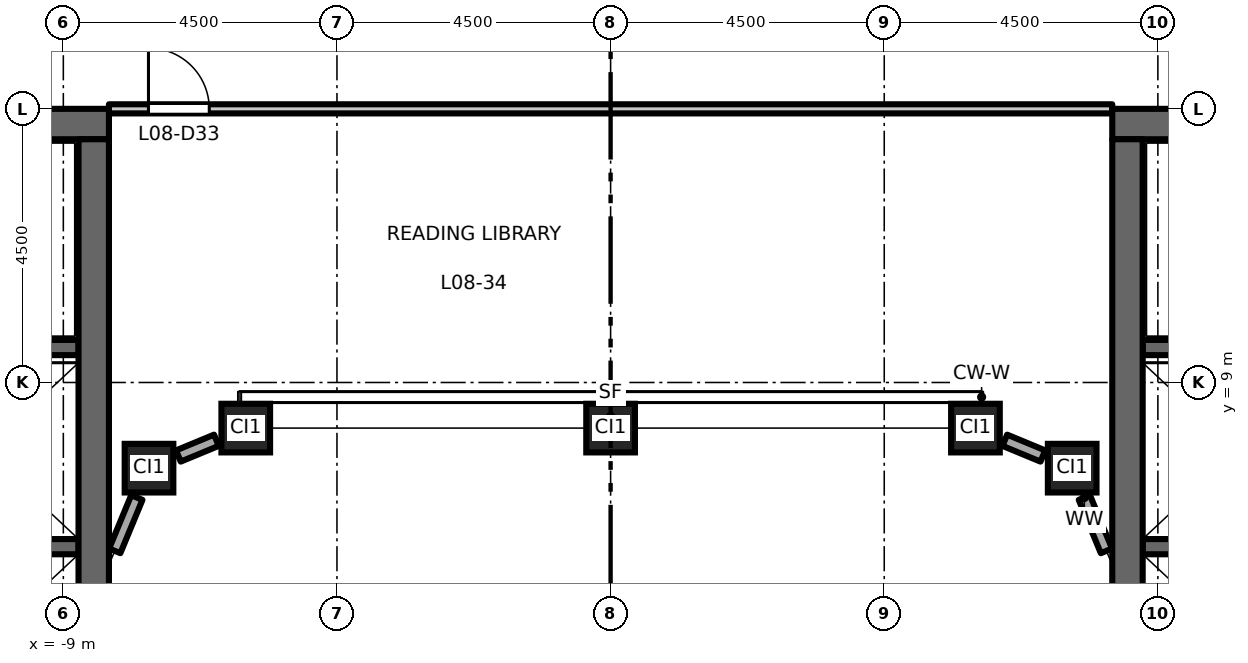
"""IFC4 building model, lengths in metres.
Left out: names, types, materials, properties, quantities, classifications, styles, units other than length and angle.
Written with IfcOpenShell. Run it as: python <this file> out.ifc"""

import sys

from ifc_helpers import new_model, si_unit, direction, frame, frame_2d, origin, origin_2d, place, context, subcontext, project, spatial, rectangle, hollow_rectangle, extrude, element, fill, save


model = new_model("IFC4")
c1 = context("Model", 3, precision=1e-05, world=origin(), true_north=direction((0.0, 1.0)))
c2 = subcontext(c1, "Body", "Model", "MODEL_VIEW")
j1 = project(units=[si_unit("LENGTHUNIT", "METRE"), si_unit("PLANEANGLEUNIT", "RADIAN")], contexts=[c1])
p1 = place(None, origin())
s1 = spatial("IfcSite", under=j1, at=p1, CompositionType="ELEMENT")
p2 = place(p1, origin())
s2 = spatial("IfcBuilding", under=s1, at=p2, CompositionType="ELEMENT")
p3 = place(p2, frame((0.0, 0.0, 40.2)))
s3 = spatial("IfcBuildingStorey", under=s2, at=p3, CompositionType="ELEMENT", Elevation=40.2)
for number, where, z_axis, x_axis in (
    (1, (-7.591, 7.591, 0.0), (0.0, 0.0, 1.0), (1.0, 0.0, 0.0)),
    (2, (-6.0, 8.25, 0.0), (0.0, 0.0, 1.0), (1.0, 0.0, 0.0)),
    (3, (0.0, 8.25, 0.0), (0.0, 0.0, 1.0), (1.0, 0.0, 0.0)),
    (4, (6.0, 8.25, 0.0), (0.0, 0.0, 1.0), (1.0, 0.0, 0.0)),
    (5, (7.591, 7.591, 0.0), (0.0, 0.0, 1.0), (1.0, 0.0, 0.0)),
):
    element("IfcColumn", number, at=place(p3, frame(where, z_axis=z_axis, x_axis=x_axis)), inside=s3, PredefinedType="COLUMN", context=c2, shape_type="SweptSolid", body=[
        extrude(hollow_rectangle(XDim=0.8, YDim=0.8, WallThickness=0.05, at=origin_2d()), origin(), (0.0, 0.0, 1.0), 4.5),
    ])
p4 = place(p3, frame((-8.75, 6.3, 0.0), z_axis=(0.0, 0.0, 1.0), x_axis=(-1.0, 0.0, 0.0)))
e6 = element("IfcWall", 6, at=p4, inside=s3, PredefinedType="SHEAR", context=c2, shape_type="SweptSolid", body=[
    extrude(rectangle(XDim=3.1, YDim=0.25, at=frame_2d((1.55, 0.0))), origin(), (0.0, 0.0, 1.0), 4.35),
])
p5 = place(p3, frame((-8.75, 9.575, 0.0), z_axis=(0.0, 0.0, 1.0), x_axis=(-1.0, 0.0, 0.0)))
e7 = element("IfcWall", 7, at=p5, inside=s3, PredefinedType="SHEAR", context=c2, shape_type="SweptSolid", body=[
    extrude(rectangle(XDim=8.0, YDim=0.25, at=frame_2d((4.0, 0.0))), origin(), (0.0, 0.0, 1.0), 4.35),
])
p6 = place(p5, frame((6.65, 0.0, 0.0)))
e8 = element("IfcOpeningElement", 8, at=p6, cuts=e7, PredefinedType="OPENING", context=c2, shape_type="SweptSolid", body=[
    extrude(rectangle(XDim=1.1, YDim=2.1, at=frame_2d((0.55, 1.05))), frame((0.0, 0.135, 0.0), z_axis=(0.0, -1.0, 0.0), x_axis=(1.0, 0.0, 0.0)), (0.0, 0.0, 1.0), 0.27),
])
p7 = place(p3, frame((-8.25, 13.25, 0.0), z_axis=(0.0, 0.0, 1.0), x_axis=(-1.0, 0.0, 0.0)))
e9 = element("IfcWall", 9, at=p7, inside=s3, PredefinedType="SHEAR", context=c2, shape_type="SweptSolid", body=[
    extrude(rectangle(XDim=13.5, YDim=0.5, at=frame_2d((6.75, 0.0))), origin(), (0.0, 0.0, 1.0), 4.35),
])
p8 = place(p3, frame((-8.5, -13.0, 0.0), z_axis=(0.0, 0.0, 1.0), x_axis=(0.0, 1.0, 0.0)))
e10 = element("IfcWall", 10, at=p8, inside=s3, PredefinedType="SHEAR", context=c2, shape_type="SweptSolid", body=[
    extrude(rectangle(XDim=26.0, YDim=0.5, at=frame_2d((13.0, 0.0))), origin(), (0.0, 0.0, 1.0), 4.35),
])
p9 = place(p3, frame((8.75, 6.3, 0.0), z_axis=(0.0, 0.0, 1.0), x_axis=(1.0, 0.0, 0.0)))
e11 = element("IfcWall", 11, at=p9, inside=s3, PredefinedType="SHEAR", context=c2, shape_type="SweptSolid", body=[
    extrude(rectangle(XDim=3.1, YDim=0.25, at=frame_2d((1.55, 0.0))), origin(), (0.0, 0.0, 1.0), 4.35),
])
p10 = place(p3, frame((8.75, 9.575, 0.0), z_axis=(0.0, 0.0, 1.0), x_axis=(1.0, 0.0, 0.0)))
e12 = element("IfcWall", 12, at=p10, inside=s3, PredefinedType="SHEAR", context=c2, shape_type="SweptSolid", body=[
    extrude(rectangle(XDim=8.0, YDim=0.25, at=frame_2d((4.0, 0.0))), origin(), (0.0, 0.0, 1.0), 4.35),
])
p11 = place(p10, frame((6.65, 0.0, 0.0)))
e13 = element("IfcOpeningElement", 13, at=p11, cuts=e12, PredefinedType="OPENING", context=c2, shape_type="SweptSolid", body=[
    extrude(rectangle(XDim=1.1, YDim=2.1, at=frame_2d((0.55, 1.05))), frame((0.0, 0.135, 0.0), z_axis=(0.0, -1.0, 0.0), x_axis=(1.0, 0.0, 0.0)), (0.0, 0.0, 1.0), 0.27),
])
p12 = place(p3, frame((8.25, 13.25, 0.0), z_axis=(0.0, 0.0, 1.0), x_axis=(1.0, 0.0, 0.0)))
e14 = element("IfcWall", 14, at=p12, inside=s3, PredefinedType="SHEAR", context=c2, shape_type="SweptSolid", body=[
    extrude(rectangle(XDim=13.5, YDim=0.5, at=frame_2d((6.75, 0.0))), origin(), (0.0, 0.0, 1.0), 4.35),
])
p13 = place(p3, frame((8.5, -13.0, 0.0), z_axis=(0.0, 0.0, 1.0), x_axis=(0.0, 1.0, 0.0)))
e15 = element("IfcWall", 15, at=p13, inside=s3, PredefinedType="SHEAR", context=c2, shape_type="SweptSolid", body=[
    extrude(rectangle(XDim=26.0, YDim=0.5, at=frame_2d((13.0, 0.0))), origin(), (0.0, 0.0, 1.0), 4.35),
])
p14 = place(p3, frame((8.154, 6.231, 0.0), z_axis=(0.0, 0.0, 1.0), x_axis=(-0.382624318388, 0.923904016107, 0.0)))
e16 = element("IfcWall", 16, at=p14, inside=s3, PredefinedType="STANDARD", context=c2, shape_type="SweptSolid", body=[
    extrude(rectangle(XDim=0.949, YDim=0.2, at=frame_2d((0.475, 0.0))), origin(), (0.0, 0.0, 1.0), 3.73),
])
for number, where, z_axis, x_axis in (
    (17, (7.108, 7.791, 0.0), (0.0, 0.0, 1.0), (-0.924, 0.383, 0.0)),
    (18, (-6.483, 8.05, 0.0), (0.0, 0.0, 1.0), (-0.924, -0.383, 0.0)),
):
    element("IfcWall", number, at=place(p3, frame(where, z_axis=z_axis, x_axis=x_axis)), inside=s3, PredefinedType="STANDARD", context=c2, shape_type="SweptSolid", body=[
        extrude(rectangle(XDim=0.677, YDim=0.2, at=frame_2d((0.338, 0.0))), origin(), (0.0, 0.0, 1.0), 3.73),
    ])
p15 = place(p3, frame((-7.791, 7.108, 0.0), z_axis=(0.0, 0.0, 1.0), x_axis=(-0.382624318388, -0.923904016107, 0.0)))
e19 = element("IfcWall", 19, at=p15, inside=s3, PredefinedType="STANDARD", context=c2, shape_type="SweptSolid", body=[
    extrude(rectangle(XDim=0.949, YDim=0.2, at=frame_2d((0.475, 0.0))), origin(), (0.0, 0.0, 1.0), 3.73),
])
p16 = place(p3, frame((-8.25, 13.5, 0.0), z_axis=(0.0, 0.0, 1.0), x_axis=(1.0, 0.0, 0.0)))
e20 = element("IfcWall", 20, at=p16, inside=s3, PredefinedType="PARTITIONING", context=c2, shape_type="SweptSolid", body=[
    extrude(rectangle(XDim=16.5, YDim=0.15, at=frame_2d((8.25, 0.0))), origin(), (0.0, 0.0, 1.0), 3.85),
])
p17 = place(p16, frame((0.65, 0.0, 0.0)))
e21 = element("IfcOpeningElement", 21, at=p17, cuts=e20, PredefinedType="OPENING", context=c2, shape_type="SweptSolid", body=[
    extrude(rectangle(XDim=1.0, YDim=2.1, at=frame_2d((0.5, 1.05))), frame((0.0, 0.085, 0.0), z_axis=(0.0, -1.0, 0.0), x_axis=(1.0, 0.0, 0.0)), (0.0, 0.0, 1.0), 0.17),
])
p18 = place(p17, origin())
e22 = element("IfcDoor", 22, at=p18, inside=s3, OperationType="SINGLE_SWING_LEFT", PredefinedType="DOOR", context=c2, shape_type="SweptSolid", body=[
    extrude(rectangle(XDim=1.0, YDim=2.1, at=frame_2d((0.5, 1.05))), frame((0.0, 0.025, 0.0), z_axis=(0.0, -1.0, 0.0), x_axis=(1.0, 0.0, 0.0)), (0.0, 0.0, 1.0), 0.05),
])
fill(e21, e22)
save(model, sys.argv[1])
